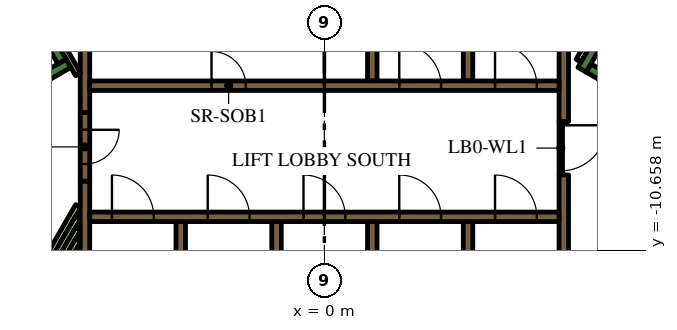
"""IFC4 building model, lengths in metres.
Left out: names, types, materials, properties, quantities, classifications, styles, units other than length and angle.
Written with IfcOpenShell. Run it as: python <this file> out.ifc"""

import sys

from ifc_helpers import new_model, si_unit, direction, frame, frame_2d, origin, place, context, subcontext, project, spatial, rectangle, extrude, element, fill, save


model = new_model("IFC4")
c1 = context("Model", 3, precision=1e-05, world=origin(), true_north=direction((0.0, 1.0)))
c2 = subcontext(c1, "Body", "Model", "MODEL_VIEW")
j1 = project(units=[si_unit("LENGTHUNIT", "METRE"), si_unit("PLANEANGLEUNIT", "RADIAN")], contexts=[c1])
p1 = place(None, origin())
s1 = spatial("IfcSite", under=j1, at=p1, CompositionType="ELEMENT")
p2 = place(p1, origin())
s2 = spatial("IfcBuilding", under=s1, at=p2, CompositionType="ELEMENT")
p3 = place(p2, frame((0.0, 0.0, 66.6)))
s3 = spatial("IfcBuildingStorey", under=s2, at=p3, CompositionType="ELEMENT", Elevation=66.6)
p4 = place(p3, frame((12.84, -9.261, 0.0), z_axis=(0.0, 0.0, 1.0), x_axis=(-0.866013990052, 0.500019768644, 0.0)))
e1 = element("IfcWall", 1, at=p4, inside=s3, PredefinedType="SOLIDWALL", context=c2, shape_type="SweptSolid", body=[
    extrude(rectangle(XDim=6.8, YDim=0.25, at=frame_2d((3.4, 0.0))), origin(), (0.0, 0.0, 1.0), 3.9),
])
p5 = place(p3, frame((6.78, -5.906, 0.0), z_axis=(0.0, 0.0, 1.0), x_axis=(0.500223362819, 0.865896406789, 0.0)))
e2 = element("IfcWall", 2, at=p5, inside=s3, PredefinedType="SOLIDWALL", context=c2, shape_type="SweptSolid", body=[
    extrude(rectangle(XDim=0.675, YDim=0.25, at=frame_2d((0.337, 0.0))), origin(), (0.0, 0.0, 1.0), 3.9),
])
p6 = place(p3, frame((-12.84, -9.261, 0.0), z_axis=(0.0, 0.0, 1.0), x_axis=(0.866016039709, 0.500016218704, 0.0)))
e3 = element("IfcWall", 3, at=p6, inside=s3, PredefinedType="SOLIDWALL", context=c2, shape_type="SweptSolid", body=[
    extrude(rectangle(XDim=7.05, YDim=0.25, at=frame_2d((3.525, 0.0))), origin(), (0.0, 0.0, 1.0), 3.9),
])
p7 = place(p3, frame((-6.905, -5.69, 0.0), z_axis=(0.0, 0.0, 1.0), x_axis=(-0.500402024738, 0.865793170242, 0.0)))
e4 = element("IfcWall", 4, at=p7, inside=s3, PredefinedType="SOLIDWALL", context=c2, shape_type="SweptSolid", body=[
    extrude(rectangle(XDim=0.425, YDim=0.25, at=frame_2d((0.212, 0.0))), origin(), (0.0, 0.0, 1.0), 3.9),
])
p8 = place(p3, frame((-3.78, -12.1, 0.0), z_axis=(0.0, 0.0, 1.0), x_axis=(0.0, 1.0, 0.0)))
e5 = element("IfcWall", 5, at=p8, inside=s3, PredefinedType="SOLIDWALL", context=c2, shape_type="SweptSolid", body=[
    extrude(rectangle(XDim=2.2, YDim=0.25, at=frame_2d((1.1, 0.0))), origin(), (0.0, 0.0, 1.0), 3.9),
])
p9 = place(p3, frame((-6.3, -12.1, 0.0), z_axis=(0.0, 0.0, 1.0), x_axis=(0.0, 1.0, 0.0)))
e6 = element("IfcWall", 6, at=p9, inside=s3, PredefinedType="SOLIDWALL", context=c2, shape_type="SweptSolid", body=[
    extrude(rectangle(XDim=3.265, YDim=0.25, at=frame_2d((1.632, 0.0))), origin(), (0.0, 0.0, 1.0), 3.9),
])
for number, where, z_axis, x_axis in (
    (7, (3.78, -4.0, 0.0), (0.0, 0.0, 1.0), (0.0, -1.0, 0.0)),
    (8, (1.26, -4.0, 0.0), (0.0, 0.0, 1.0), (0.0, -1.0, 0.0)),
):
    element("IfcWall", number, at=place(p3, frame(where, z_axis=z_axis, x_axis=x_axis)), inside=s3, PredefinedType="SOLIDWALL", context=c2, shape_type="SweptSolid", body=[
        extrude(rectangle(XDim=2.2, YDim=0.25, at=frame_2d((1.1, 0.0))), origin(), (0.0, 0.0, 1.0), 3.9),
    ])
p10 = place(p3, frame((-6.3, -7.035, 0.0), z_axis=(0.0, 0.0, 1.0), x_axis=(0.0, 1.0, 0.0)))
e9 = element("IfcWall", 9, at=p10, inside=s3, PredefinedType="SOLIDWALL", context=c2, shape_type="SweptSolid", body=[
    extrude(rectangle(XDim=3.285, YDim=0.25, at=frame_2d((1.643, 0.0))), origin(), (0.0, 0.0, 1.0), 3.9),
])
p11 = place(p3, frame((6.3, -7.27, 0.0), z_axis=(0.0, 0.0, 1.0), x_axis=(0.0, 1.0, 0.0)))
e10 = element("IfcWall", 10, at=p11, inside=s3, PredefinedType="SOLIDWALL", context=c2, shape_type="SweptSolid", body=[
    extrude(rectangle(XDim=3.586, YDim=0.25, at=frame_2d((1.793, 0.0))), origin(), (0.0, 0.0, 1.0), 3.9),
])
p12 = place(p3, frame((6.3, -12.1, 0.0), z_axis=(0.0, 0.0, 1.0), x_axis=(0.0, 1.0, 0.0)))
e11 = element("IfcWall", 11, at=p12, inside=s3, PredefinedType="SOLIDWALL", context=c2, shape_type="SweptSolid", body=[
    extrude(rectangle(XDim=3.428, YDim=0.25, at=frame_2d((1.714, 0.0))), origin(), (0.0, 0.0, 1.0), 3.9),
])
for number, where, z_axis, x_axis in (
    (12, (3.78, -12.1, 0.0), (0.0, 0.0, 1.0), (0.0, 1.0, 0.0)),
    (13, (1.26, -12.1, 0.0), (0.0, 0.0, 1.0), (0.0, 1.0, 0.0)),
    (14, (-1.26, -12.1, 0.0), (0.0, 0.0, 1.0), (0.0, 1.0, 0.0)),
):
    element("IfcWall", number, at=place(p3, frame(where, z_axis=z_axis, x_axis=x_axis)), inside=s3, PredefinedType="SOLIDWALL", context=c2, shape_type="SweptSolid", body=[
        extrude(rectangle(XDim=2.2, YDim=0.25, at=frame_2d((1.1, 0.0))), origin(), (0.0, 0.0, 1.0), 3.9),
    ])
p13 = place(p3, frame((-7.968, -12.068, 0.0), z_axis=(0.0, 0.0, 1.0), x_axis=(0.500013701029, 0.866017493347, 0.0)))
e15 = element("IfcWall", 15, at=p13, inside=s3, PredefinedType="PARTITIONING", context=c2, shape_type="SweptSolid", body=[
    extrude(rectangle(XDim=2.975, YDim=0.15, at=frame_2d((1.488, 0.0))), origin(), (0.0, 0.0, 1.0), 2.75),
])
p14 = place(p3, frame((-7.794, -12.068, 0.0), z_axis=(0.0, 0.0, 1.0), x_axis=(0.499985098601, 0.86603400694, 0.0)))
e16 = element("IfcWall", 16, at=p14, inside=s3, PredefinedType="PARTITIONING", context=c2, shape_type="SweptSolid", body=[
    extrude(rectangle(XDim=2.628, YDim=0.15, at=frame_2d((1.314, 0.0))), origin(), (0.0, 0.0, 1.0), 2.75),
])
p15 = place(p3, frame((-7.621, -12.068, 0.0), z_axis=(0.0, 0.0, 1.0), x_axis=(0.500028047758, 0.866009209798, 0.0)))
e17 = element("IfcWall", 17, at=p15, inside=s3, PredefinedType="PARTITIONING", context=c2, shape_type="SweptSolid", body=[
    extrude(rectangle(XDim=2.282, YDim=0.15, at=frame_2d((1.141, 0.0))), origin(), (0.0, 0.0, 1.0), 2.75),
])
p16 = place(p3, frame((-7.448, -12.068, 0.0), z_axis=(0.0, 0.0, 1.0), x_axis=(0.500031751504, 0.866007071269, 0.0)))
e18 = element("IfcWall", 18, at=p16, inside=s3, PredefinedType="PARTITIONING", context=c2, shape_type="SweptSolid", body=[
    extrude(rectangle(XDim=1.936, YDim=0.15, at=frame_2d((0.968, 0.0))), origin(), (0.0, 0.0, 1.0), 2.75),
])
p17 = place(p3, frame((-6.48, -6.027, 0.0), z_axis=(0.0, 0.0, 1.0), x_axis=(-0.499927229454, 0.866067413802, 0.0)))
e19 = element("IfcWall", 19, at=p17, inside=s3, PredefinedType="PARTITIONING", context=c2, shape_type="SweptSolid", body=[
    extrude(rectangle(XDim=0.929, YDim=0.15, at=frame_2d((0.464, 0.0))), origin(), (0.0, 0.0, 1.0), 3.9),
])
p18 = place(p3, frame((6.945, -5.222, 0.0), z_axis=(0.0, 0.0, 1.0), x_axis=(-0.499818422106, -0.866130212453, 0.0)))
e20 = element("IfcWall", 20, at=p18, inside=s3, PredefinedType="PARTITIONING", context=c2, shape_type="SweptSolid", body=[
    extrude(rectangle(XDim=0.514, YDim=0.15, at=frame_2d((0.257, 0.0))), origin(), (0.0, 0.0, 1.0), 2.75),
])
p19 = place(p3, frame((-6.175, -9.775, 0.0), z_axis=(0.0, 0.0, 1.0), x_axis=(1.0, 0.0, 0.0)))
e21 = element("IfcWall", 21, at=p19, inside=s3, PredefinedType="SOLIDWALL", context=c2, shape_type="SweptSolid", body=[
    extrude(rectangle(XDim=12.35, YDim=0.25, at=frame_2d((6.175, 0.0))), origin(), (0.0, 0.0, 1.0), 3.9),
])
p20 = place(p19, frame((0.585, 0.0, 0.0)))
e22 = element("IfcOpeningElement", 22, at=p20, cuts=e21, PredefinedType="OPENING", context=c2, shape_type="SweptSolid", body=[
    extrude(rectangle(XDim=1.1, YDim=2.1, at=frame_2d((0.55, 1.05))), frame((0.0, 0.135, 0.0), z_axis=(0.0, -1.0, 0.0), x_axis=(1.0, 0.0, 0.0)), (0.0, 0.0, 1.0), 0.27),
])
p21 = place(p19, frame((3.105, 0.0, 0.0)))
e23 = element("IfcOpeningElement", 23, at=p21, cuts=e21, PredefinedType="OPENING", context=c2, shape_type="SweptSolid", body=[
    extrude(rectangle(XDim=1.1, YDim=2.1, at=frame_2d((0.55, 1.05))), frame((0.0, 0.135, 0.0), z_axis=(0.0, -1.0, 0.0), x_axis=(1.0, 0.0, 0.0)), (0.0, 0.0, 1.0), 0.27),
])
p22 = place(p19, frame((5.625, 0.0, 0.0)))
e24 = element("IfcOpeningElement", 24, at=p22, cuts=e21, PredefinedType="OPENING", context=c2, shape_type="SweptSolid", body=[
    extrude(rectangle(XDim=1.1, YDim=2.1, at=frame_2d((0.55, 1.05))), frame((0.0, 0.135, 0.0), z_axis=(0.0, -1.0, 0.0), x_axis=(1.0, 0.0, 0.0)), (0.0, 0.0, 1.0), 0.27),
])
p23 = place(p19, frame((8.145, 0.0, 0.0)))
e25 = element("IfcOpeningElement", 25, at=p23, cuts=e21, PredefinedType="OPENING", context=c2, shape_type="SweptSolid", body=[
    extrude(rectangle(XDim=1.1, YDim=2.1, at=frame_2d((0.55, 1.05))), frame((0.0, 0.135, 0.0), z_axis=(0.0, -1.0, 0.0), x_axis=(1.0, 0.0, 0.0)), (0.0, 0.0, 1.0), 0.27),
])
p24 = place(p19, frame((10.665, 0.0, 0.0)))
e26 = element("IfcOpeningElement", 26, at=p24, cuts=e21, PredefinedType="OPENING", context=c2, shape_type="SweptSolid", body=[
    extrude(rectangle(XDim=1.1, YDim=2.1, at=frame_2d((0.55, 1.05))), frame((0.0, 0.135, 0.0), z_axis=(0.0, -1.0, 0.0), x_axis=(1.0, 0.0, 0.0)), (0.0, 0.0, 1.0), 0.27),
])
p25 = place(p3, frame((-6.175, -6.325, 0.0), z_axis=(0.0, 0.0, 1.0), x_axis=(1.0, 0.0, 0.0)))
e27 = element("IfcWall", 27, at=p25, inside=s3, PredefinedType="SOLIDWALL", context=c2, shape_type="SweptSolid", body=[
    extrude(rectangle(XDim=12.35, YDim=0.25, at=frame_2d((6.175, 0.0))), origin(), (0.0, 0.0, 1.0), 3.9),
])
p26 = place(p25, frame((3.205, 0.0, 0.0)))
e28 = element("IfcOpeningElement", 28, at=p26, cuts=e27, PredefinedType="OPENING", context=c2, shape_type="SweptSolid", body=[
    extrude(rectangle(XDim=0.9, YDim=2.1, at=frame_2d((0.45, 1.05))), frame((0.0, 0.135, 0.0), z_axis=(0.0, -1.0, 0.0), x_axis=(1.0, 0.0, 0.0)), (0.0, 0.0, 1.0), 0.27),
])
p27 = place(p25, frame((8.145, 0.0, 0.0)))
e29 = element("IfcOpeningElement", 29, at=p27, cuts=e27, PredefinedType="OPENING", context=c2, shape_type="SweptSolid", body=[
    extrude(rectangle(XDim=1.1, YDim=2.1, at=frame_2d((0.55, 1.05))), frame((0.0, 0.135, 0.0), z_axis=(0.0, -1.0, 0.0), x_axis=(1.0, 0.0, 0.0)), (0.0, 0.0, 1.0), 0.27),
])
p28 = place(p25, frame((10.665, 0.0, 0.0)))
e30 = element("IfcOpeningElement", 30, at=p28, cuts=e27, PredefinedType="OPENING", context=c2, shape_type="SweptSolid", body=[
    extrude(rectangle(XDim=1.1, YDim=2.1, at=frame_2d((0.55, 1.05))), frame((0.0, 0.135, 0.0), z_axis=(0.0, -1.0, 0.0), x_axis=(1.0, 0.0, 0.0)), (0.0, 0.0, 1.0), 0.27),
])
p29 = place(p3, frame((-6.3, -7.035, 0.0), z_axis=(0.0, 0.0, 1.0), x_axis=(0.0, -1.0, 0.0)))
e31 = element("IfcWall", 31, at=p29, inside=s3, PredefinedType="SOLIDWALL", context=c2, shape_type="SweptSolid", body=[
    extrude(rectangle(XDim=1.8, YDim=0.25, at=frame_2d((0.9, 0.0))), origin(), (0.0, 0.0, 1.0), 3.9),
])
p30 = place(p29, frame((0.45, 0.0, 0.0)))
e32 = element("IfcOpeningElement", 32, at=p30, cuts=e31, PredefinedType="OPENING", context=c2, shape_type="SweptSolid", body=[
    extrude(rectangle(XDim=0.9, YDim=2.1, at=frame_2d((0.45, 1.05))), frame((0.0, 0.135, 0.0), z_axis=(0.0, -1.0, 0.0), x_axis=(1.0, 0.0, 0.0)), (0.0, 0.0, 1.0), 0.27),
])
p31 = place(p3, frame((6.22, -7.266, 0.0), z_axis=(0.0, 0.0, 1.0), x_axis=(0.0, -1.0, 0.0)))
e33 = element("IfcWall", 33, at=p31, inside=s3, PredefinedType="PARTITIONING", context=c2, shape_type="SweptSolid", body=[
    extrude(rectangle(XDim=1.4, YDim=0.09, at=frame_2d((0.7, 0.0))), origin(), (0.0, 0.0, 1.0), 2.75),
])
p32 = place(p31, frame((0.1, 0.0, 0.0)))
e34 = element("IfcOpeningElement", 34, at=p32, cuts=e33, PredefinedType="OPENING", context=c2, shape_type="SweptSolid", body=[
    extrude(rectangle(XDim=1.2, YDim=2.1, at=frame_2d((0.6, 1.05))), frame((0.0, 0.055, 0.0), z_axis=(0.0, -1.0, 0.0), x_axis=(1.0, 0.0, 0.0)), (0.0, 0.0, 1.0), 0.11),
])
p33 = place(p20, origin())
e35 = element("IfcDoor", 35, at=p33, inside=s3, OperationType="DOUBLE_DOOR_SLIDING", PredefinedType="DOOR", context=c2, shape_type="SweptSolid", body=[
    extrude(rectangle(XDim=1.1, YDim=2.1, at=frame_2d((0.55, 1.05))), frame((0.0, 0.025, 0.0), z_axis=(0.0, -1.0, 0.0), x_axis=(1.0, 0.0, 0.0)), (0.0, 0.0, 1.0), 0.05),
])
fill(e22, e35)
p34 = place(p21, origin())
e36 = element("IfcDoor", 36, at=p34, inside=s3, OperationType="DOUBLE_DOOR_SLIDING", PredefinedType="DOOR", context=c2, shape_type="SweptSolid", body=[
    extrude(rectangle(XDim=1.1, YDim=2.1, at=frame_2d((0.55, 1.05))), frame((0.0, 0.025, 0.0), z_axis=(0.0, -1.0, 0.0), x_axis=(1.0, 0.0, 0.0)), (0.0, 0.0, 1.0), 0.05),
])
fill(e23, e36)
p35 = place(p22, origin())
e37 = element("IfcDoor", 37, at=p35, inside=s3, OperationType="DOUBLE_DOOR_SLIDING", PredefinedType="DOOR", context=c2, shape_type="SweptSolid", body=[
    extrude(rectangle(XDim=1.1, YDim=2.1, at=frame_2d((0.55, 1.05))), frame((0.0, 0.025, 0.0), z_axis=(0.0, -1.0, 0.0), x_axis=(1.0, 0.0, 0.0)), (0.0, 0.0, 1.0), 0.05),
])
fill(e24, e37)
p36 = place(p23, origin())
e38 = element("IfcDoor", 38, at=p36, inside=s3, OperationType="DOUBLE_DOOR_SLIDING", PredefinedType="DOOR", context=c2, shape_type="SweptSolid", body=[
    extrude(rectangle(XDim=1.1, YDim=2.1, at=frame_2d((0.55, 1.05))), frame((0.0, 0.025, 0.0), z_axis=(0.0, -1.0, 0.0), x_axis=(1.0, 0.0, 0.0)), (0.0, 0.0, 1.0), 0.05),
])
fill(e25, e38)
p37 = place(p24, origin())
e39 = element("IfcDoor", 39, at=p37, inside=s3, OperationType="DOUBLE_DOOR_SLIDING", PredefinedType="DOOR", context=c2, shape_type="SweptSolid", body=[
    extrude(rectangle(XDim=1.1, YDim=2.1, at=frame_2d((0.55, 1.05))), frame((0.0, 0.025, 0.0), z_axis=(0.0, -1.0, 0.0), x_axis=(1.0, 0.0, 0.0)), (0.0, 0.0, 1.0), 0.05),
])
fill(e26, e39)
p38 = place(p26, origin())
e40 = element("IfcDoor", 40, at=p38, inside=s3, OperationType="SINGLE_SWING_LEFT", PredefinedType="DOOR", context=c2, shape_type="SweptSolid", body=[
    extrude(rectangle(XDim=0.9, YDim=2.1, at=frame_2d((0.45, 1.05))), frame((0.0, 0.025, 0.0), z_axis=(0.0, -1.0, 0.0), x_axis=(1.0, 0.0, 0.0)), (0.0, 0.0, 1.0), 0.05),
])
fill(e28, e40)
p39 = place(p27, origin())
e41 = element("IfcDoor", 41, at=p39, inside=s3, OperationType="DOUBLE_DOOR_SLIDING", PredefinedType="DOOR", context=c2, shape_type="SweptSolid", body=[
    extrude(rectangle(XDim=1.1, YDim=2.1, at=frame_2d((0.55, 1.05))), frame((0.0, 0.025, 0.0), z_axis=(0.0, -1.0, 0.0), x_axis=(1.0, 0.0, 0.0)), (0.0, 0.0, 1.0), 0.05),
])
fill(e29, e41)
p40 = place(p28, origin())
e42 = element("IfcDoor", 42, at=p40, inside=s3, OperationType="DOUBLE_DOOR_SLIDING", PredefinedType="DOOR", context=c2, shape_type="SweptSolid", body=[
    extrude(rectangle(XDim=1.1, YDim=2.1, at=frame_2d((0.55, 1.05))), frame((0.0, 0.025, 0.0), z_axis=(0.0, -1.0, 0.0), x_axis=(1.0, 0.0, 0.0)), (0.0, 0.0, 1.0), 0.05),
])
fill(e30, e42)
p41 = place(p30, origin())
e43 = element("IfcDoor", 43, at=p41, inside=s3, OperationType="SINGLE_SWING_LEFT", PredefinedType="DOOR", context=c2, shape_type="SweptSolid", body=[
    extrude(rectangle(XDim=0.9, YDim=2.1, at=frame_2d((0.45, 1.05))), frame((0.0, 0.025, 0.0), z_axis=(0.0, -1.0, 0.0), x_axis=(1.0, 0.0, 0.0)), (0.0, 0.0, 1.0), 0.05),
])
fill(e32, e43)
p42 = place(p32, origin())
e44 = element("IfcDoor", 44, at=p42, inside=s3, OperationType="SINGLE_SWING_LEFT", PredefinedType="DOOR", context=c2, shape_type="SweptSolid", body=[
    extrude(rectangle(XDim=1.2, YDim=2.1, at=frame_2d((0.6, 1.05))), frame((0.0, 0.025, 0.0), z_axis=(0.0, -1.0, 0.0), x_axis=(1.0, 0.0, 0.0)), (0.0, 0.0, 1.0), 0.05),
])
fill(e34, e44)
save(model, sys.argv[1])
